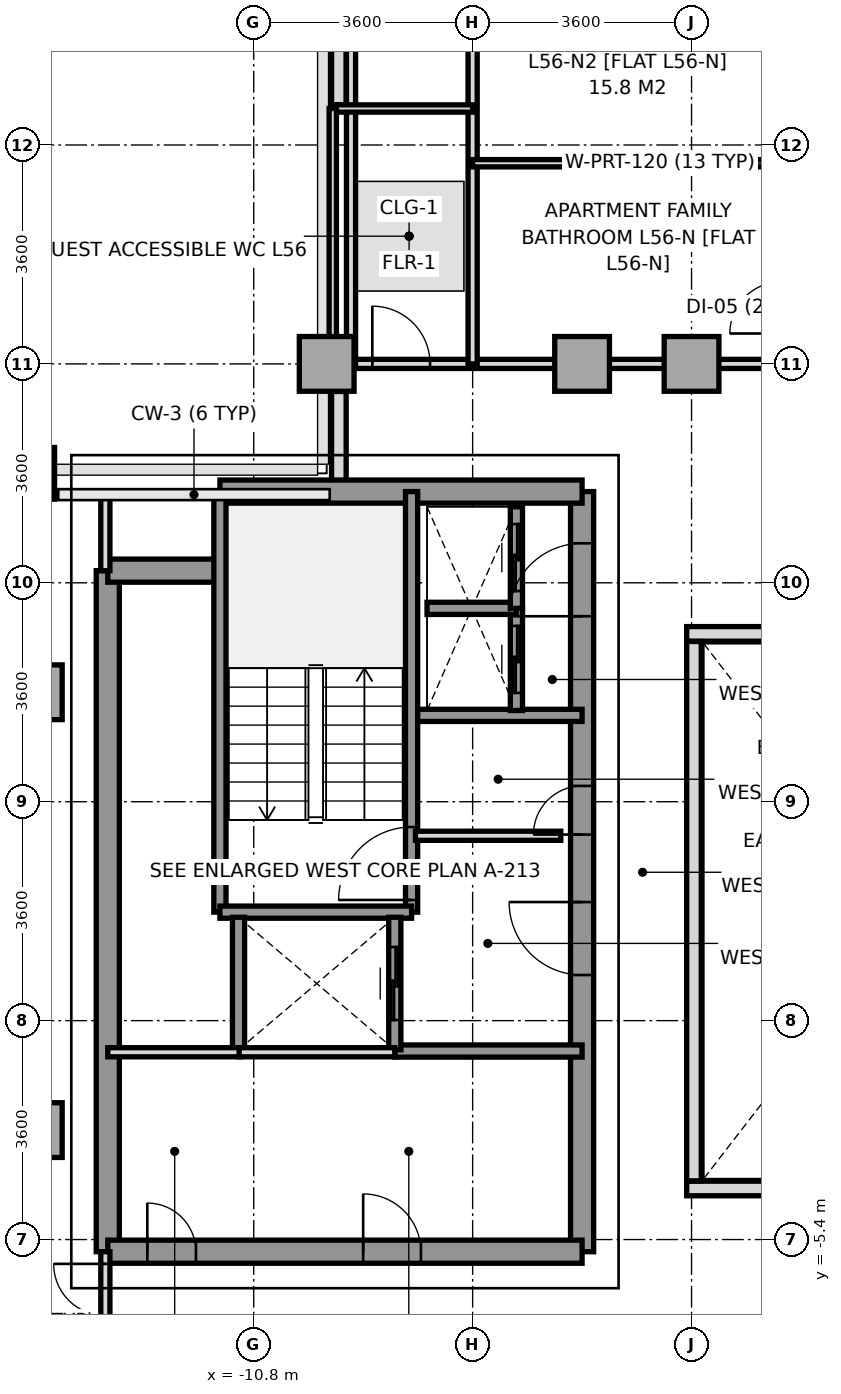
"""IFC4 building model, lengths in metres.
Left out: names, types, materials, properties, quantities, classifications, styles, units other than length and angle.
Written with IfcOpenShell. Run it as: python <this file> out.ifc"""

import sys

from ifc_helpers import new_model, si_unit, direction, frame, frame_2d, origin, origin_2d, place, context, subcontext, project, spatial, rectangle, extrude, source, transform, mapped, element, fill, save


model = new_model("IFC4")
c1 = context("Model", 3, precision=1e-05, world=origin(), true_north=direction((0.0, 1.0)))
c2 = subcontext(c1, "Body", "Model", "MODEL_VIEW")
j1 = project(units=[si_unit("LENGTHUNIT", "METRE"), si_unit("PLANEANGLEUNIT", "RADIAN")], contexts=[c1])
p1 = place(None, origin())
s1 = spatial("IfcSite", under=j1, at=p1, CompositionType="ELEMENT")
p2 = place(p1, origin())
s2 = spatial("IfcBuilding", under=s1, at=p2, CompositionType="ELEMENT")
p3 = place(p2, frame((0.0, 0.0, 204.6)))
s3 = spatial("IfcBuildingStorey", under=s2, at=p3, CompositionType="ELEMENT", Elevation=204.6)
m1 = source(origin(), c2, "Body", "SweptSolid", [
    extrude(rectangle(XDim=0.9, YDim=0.9, at=origin_2d()), origin(), (0.0, 0.0, 1.0), 3.2),
])
for number, where, z_axis, x_axis in (
    (1, (-14.4, -3.6, 0.0), (0.0, 0.0, 1.0), (1.0, 0.0, 0.0)),
    (2, (-14.4, 3.6, 0.0), (0.0, 0.0, 1.0), (1.0, 0.0, 0.0)),
):
    element("IfcColumn", number, at=place(p3, frame(where, z_axis=z_axis, x_axis=x_axis)), inside=s3, PredefinedType="COLUMN", context=c2, shape_type="MappedRepresentation", body=[
        mapped(m1, transform((0.0, 0.0, 0.0), x_axis=(1.0, 0.0, 0.0), y_axis=(0.0, 1.0, 0.0), z_axis=(0.0, 0.0, 1.0), scale=1.0)),
    ])
m2 = source(origin(), c2, "Body", "SweptSolid", [
    extrude(rectangle(XDim=0.65, YDim=0.85, at=origin_2d()), origin(), (0.0, 0.0, 1.0), 3.2),
])
p4 = place(p3, frame((-14.4, 7.2, 0.0), z_axis=(0.0, 0.0, 1.0), x_axis=(1.0, 0.0, 0.0)))
e3 = element("IfcColumn", 3, at=p4, inside=s3, PredefinedType="COLUMN", context=c2, shape_type="MappedRepresentation", body=[
    mapped(m2, transform((0.0, 0.0, 0.0), x_axis=(1.0, 0.0, 0.0), y_axis=(0.0, 1.0, 0.0), z_axis=(0.0, 0.0, 1.0), scale=1.0)),
])
for number, where, z_axis, x_axis in (
    (4, (-9.6, 9.0, 0.0), (0.0, 0.0, 1.0), (1.0, 0.0, 0.0)),
    (5, (-5.4, 9.0, 0.0), (0.0, 0.0, 1.0), (1.0, 0.0, 0.0)),
    (6, (-3.6, 9.0, 0.0), (0.0, 0.0, 1.0), (1.0, 0.0, 0.0)),
):
    element("IfcColumn", number, at=place(p3, frame(where, z_axis=z_axis, x_axis=x_axis)), inside=s3, PredefinedType="COLUMN", context=c2, shape_type="MappedRepresentation", body=[
        mapped(m1, transform((0.0, 0.0, 0.0), x_axis=(1.0, 0.0, 0.0), y_axis=(0.0, 1.0, 0.0), z_axis=(0.0, 0.0, 1.0), scale=1.0)),
    ])
p5 = place(p3, frame((-9.4, 6.953, 0.0), z_axis=(0.0, 0.0, 1.0), x_axis=(0.0, 1.0, 0.0)))
e7 = element("IfcWall", 7, at=p5, inside=s3, PredefinedType="PARAPET", context=c2, shape_type="SweptSolid", body=[
    extrude(rectangle(XDim=1.594, YDim=0.24, at=frame_2d((0.797, 0.0))), origin(), (0.0, 0.0, 1.0), 1.15),
])
p6 = place(p3, frame((-9.4, 13.263, 0.0), z_axis=(0.0, 0.0, 1.0), x_axis=(0.0, 1.0, 0.0)))
e8 = element("IfcWall", 8, at=p6, inside=s3, PredefinedType="PARAPET", context=c2, shape_type="SweptSolid", body=[
    extrude(rectangle(XDim=2.34, YDim=0.24, at=frame_2d((1.17, 0.0))), origin(), (0.0, 0.0, 1.0), 1.15),
])
p7 = place(p3, frame((-13.2, -5.6, 0.0), z_axis=(0.0, 0.0, 1.0), x_axis=(0.0, 1.0, 0.0)))
e9 = element("IfcWall", 9, at=p7, inside=s3, PredefinedType="SHEAR", context=c2, shape_type="SweptSolid", body=[
    extrude(rectangle(XDim=11.2, YDim=0.38, at=frame_2d((5.6, 0.0))), origin(), (0.0, 0.0, 1.0), 3.2),
])
p8 = place(p3, frame((-5.4, -5.6, 0.0), z_axis=(0.0, 0.0, 1.0), x_axis=(0.0, 1.0, 0.0)))
e10 = element("IfcWall", 10, at=p8, inside=s3, PredefinedType="SHEAR", context=c2, shape_type="SweptSolid", body=[
    extrude(rectangle(XDim=12.5, YDim=0.38, at=frame_2d((6.25, 0.0))), origin(), (0.0, 0.0, 1.0), 3.2),
])
p9 = place(p8, frame((4.55, 0.0, 0.0)))
e11 = element("IfcOpeningElement", 11, at=p9, cuts=e10, PredefinedType="OPENING", context=c2, shape_type="SweptSolid", body=[
    extrude(rectangle(XDim=1.2, YDim=2.2, at=frame_2d((0.6, 1.1))), frame((0.0, 0.2, 0.0), z_axis=(0.0, -1.0, 0.0), x_axis=(1.0, 0.0, 0.0)), (0.0, 0.0, 1.0), 0.4),
])
p10 = place(p8, frame((10.45, 0.0, 0.0)))
e12 = element("IfcOpeningElement", 12, at=p10, cuts=e10, PredefinedType="OPENING", context=c2, shape_type="SweptSolid", body=[
    extrude(rectangle(XDim=1.2, YDim=2.2, at=frame_2d((0.6, 1.1))), frame((0.0, 0.2, 0.0), z_axis=(0.0, -1.0, 0.0), x_axis=(1.0, 0.0, 0.0)), (0.0, 0.0, 1.0), 0.4),
])
p11 = place(p8, frame((6.86, 0.0, 0.0)))
e13 = element("IfcOpeningElement", 13, at=p11, cuts=e10, PredefinedType="OPENING", context=c2, shape_type="SweptSolid", body=[
    extrude(rectangle(XDim=0.8, YDim=2.1, at=frame_2d((0.4, 1.05))), frame((0.0, 0.2, 0.0), z_axis=(0.0, -1.0, 0.0), x_axis=(1.0, 0.0, 0.0)), (0.0, 0.0, 1.0), 0.4),
])
p12 = place(p3, frame((-11.356, 6.9, 0.0), z_axis=(0.0, 0.0, 1.0), x_axis=(1.0, 0.0, 0.0)))
e14 = element("IfcWall", 14, at=p12, inside=s3, PredefinedType="SHEAR", context=c2, shape_type="SweptSolid", body=[
    extrude(rectangle(XDim=5.956, YDim=0.38, at=frame_2d((2.978, 0.0))), origin(), (0.0, 0.0, 1.0), 3.2),
])
p13 = place(p3, frame((-13.2, 5.6, 0.0), z_axis=(0.0, 0.0, 1.0), x_axis=(1.0, 0.0, 0.0)))
e15 = element("IfcWall", 15, at=p13, inside=s3, PredefinedType="SHEAR", context=c2, shape_type="SweptSolid", body=[
    extrude(rectangle(XDim=1.844, YDim=0.38, at=frame_2d((0.922, 0.0))), origin(), (0.0, 0.0, 1.0), 3.2),
])
p14 = place(p3, frame((-13.2, -5.6, 0.0), z_axis=(0.0, 0.0, 1.0), x_axis=(1.0, 0.0, 0.0)))
e16 = element("IfcWall", 16, at=p14, inside=s3, PredefinedType="SHEAR", context=c2, shape_type="SweptSolid", body=[
    extrude(rectangle(XDim=7.8, YDim=0.38, at=frame_2d((3.9, 0.0))), origin(), (0.0, 0.0, 1.0), 3.2),
])
p15 = place(p14, frame((0.65, 0.0, 0.0)))
e17 = element("IfcOpeningElement", 17, at=p15, cuts=e16, PredefinedType="OPENING", context=c2, shape_type="SweptSolid", body=[
    extrude(rectangle(XDim=0.8, YDim=2.1, at=frame_2d((0.4, 1.05))), frame((0.0, 0.2, 0.0), z_axis=(0.0, -1.0, 0.0), x_axis=(1.0, 0.0, 0.0)), (0.0, 0.0, 1.0), 0.4),
])
p16 = place(p14, frame((4.2, 0.0, 0.0)))
e18 = element("IfcOpeningElement", 18, at=p16, cuts=e16, PredefinedType="OPENING", context=c2, shape_type="SweptSolid", body=[
    extrude(rectangle(XDim=0.95, YDim=2.15, at=frame_2d((0.475, 1.075))), frame((0.0, 0.2, 0.0), z_axis=(0.0, -1.0, 0.0), x_axis=(1.0, 0.0, 0.0)), (0.0, 0.0, 1.0), 0.4),
])
p17 = place(p3, frame((-8.18, 3.22, 0.0), z_axis=(0.0, 0.0, 1.0), x_axis=(1.0, 0.0, 0.0)))
e19 = element("IfcWall", 19, at=p17, inside=s3, PredefinedType="SOLIDWALL", context=c2, shape_type="SweptSolid", body=[
    extrude(rectangle(XDim=2.78, YDim=0.2, at=frame_2d((1.39, 0.0))), origin(), (0.0, 0.0, 1.0), 3.2),
])
p18 = place(p3, frame((-8.48, -2.3, 0.0), z_axis=(0.0, 0.0, 1.0), x_axis=(1.0, 0.0, 0.0)))
e20 = element("IfcWall", 20, at=p18, inside=s3, PredefinedType="SOLIDWALL", context=c2, shape_type="SweptSolid", body=[
    extrude(rectangle(XDim=3.08, YDim=0.2, at=frame_2d((1.54, 0.0))), origin(), (0.0, 0.0, 1.0), 3.2),
])
p19 = place(p3, frame((-8.204, -0.016, 0.0), z_axis=(0.0, 0.0, 1.0), x_axis=(0.0, 1.0, 0.0)))
e21 = element("IfcWall", 21, at=p19, inside=s3, PredefinedType="SOLIDWALL", context=c2, shape_type="SweptSolid", body=[
    extrude(rectangle(XDim=6.916, YDim=0.2, at=frame_2d((3.458, 0.0))), origin(), (0.0, 0.0, 1.0), 3.2),
])
p20 = place(p19, frame((0.2, 0.0, 0.0)))
e22 = element("IfcOpeningElement", 22, at=p20, cuts=e21, PredefinedType="OPENING", context=c2, shape_type="SweptSolid", body=[
    extrude(rectangle(XDim=1.2, YDim=2.2, at=frame_2d((0.6, 1.1))), frame((0.0, 0.11, 0.0), z_axis=(0.0, -1.0, 0.0), x_axis=(1.0, 0.0, 0.0)), (0.0, 0.0, 1.0), 0.22),
])
p21 = place(p3, frame((-11.356, -0.016, 0.0), z_axis=(0.0, 0.0, 1.0), x_axis=(0.0, 1.0, 0.0)))
e23 = element("IfcWall", 23, at=p21, inside=s3, PredefinedType="SOLIDWALL", context=c2, shape_type="SweptSolid", body=[
    extrude(rectangle(XDim=6.916, YDim=0.2, at=frame_2d((3.458, 0.0))), origin(), (0.0, 0.0, 1.0), 3.2),
])
p22 = place(p3, frame((-11.356, -0.016, 0.0), z_axis=(0.0, 0.0, 1.0), x_axis=(1.0, 0.0, 0.0)))
e24 = element("IfcWall", 24, at=p22, inside=s3, PredefinedType="SOLIDWALL", context=c2, shape_type="SweptSolid", body=[
    extrude(rectangle(XDim=3.152, YDim=0.2, at=frame_2d((1.576, 0.0))), origin(), (0.0, 0.0, 1.0), 3.2),
])
p23 = place(p3, frame((-11.05, -2.28, 0.0), z_axis=(0.0, 0.0, 1.0), x_axis=(0.0, 1.0, 0.0)))
e25 = element("IfcWall", 25, at=p23, inside=s3, PredefinedType="SOLIDWALL", context=c2, shape_type="SweptSolid", body=[
    extrude(rectangle(XDim=2.18, YDim=0.2, at=frame_2d((1.09, 0.0))), origin(), (0.0, 0.0, 1.0), 3.2),
])
p24 = place(p3, frame((-8.48, -2.28, 0.0), z_axis=(0.0, 0.0, 1.0), x_axis=(0.0, 1.0, 0.0)))
e26 = element("IfcWall", 26, at=p24, inside=s3, PredefinedType="SOLIDWALL", context=c2, shape_type="SweptSolid", body=[
    extrude(rectangle(XDim=2.18, YDim=0.2, at=frame_2d((1.09, 0.0))), origin(), (0.0, 0.0, 1.0), 3.2),
])
p25 = place(p24, frame((0.49, 0.0, 0.0)))
e27 = element("IfcOpeningElement", 27, at=p25, cuts=e26, PredefinedType="OPENING", context=c2, shape_type="SweptSolid", body=[
    extrude(rectangle(XDim=1.2, YDim=2.2, at=frame_2d((0.6, 1.1))), frame((0.0, 0.11, 0.0), z_axis=(0.0, -1.0, 0.0), x_axis=(1.0, 0.0, 0.0)), (0.0, 0.0, 1.0), 0.22),
])
p26 = place(p3, frame((-6.48, 3.3, 0.0), z_axis=(0.0, 0.0, 1.0), x_axis=(0.0, 1.0, 0.0)))
e28 = element("IfcWall", 28, at=p26, inside=s3, PredefinedType="SOLIDWALL", context=c2, shape_type="SweptSolid", body=[
    extrude(rectangle(XDim=1.68, YDim=0.2, at=frame_2d((0.84, 0.0))), origin(), (0.0, 0.0, 1.0), 3.2),
])
p27 = place(p26, frame((0.29, 0.0, 0.0)))
e29 = element("IfcOpeningElement", 29, at=p27, cuts=e28, PredefinedType="OPENING", context=c2, shape_type="SweptSolid", body=[
    extrude(rectangle(XDim=1.1, YDim=2.2, at=frame_2d((0.55, 1.1))), frame((0.0, 0.11, 0.0), z_axis=(0.0, -1.0, 0.0), x_axis=(1.0, 0.0, 0.0)), (0.0, 0.0, 1.0), 0.22),
])
p28 = place(p3, frame((-7.95, 4.98, 0.0), z_axis=(0.0, 0.0, 1.0), x_axis=(1.0, 0.0, 0.0)))
e30 = element("IfcWall", 30, at=p28, inside=s3, PredefinedType="SOLIDWALL", context=c2, shape_type="SweptSolid", body=[
    extrude(rectangle(XDim=1.47, YDim=0.2, at=frame_2d((0.735, 0.0))), origin(), (0.0, 0.0, 1.0), 3.2),
])
p29 = place(p3, frame((-6.48, 4.98, 0.0), z_axis=(0.0, 0.0, 1.0), x_axis=(0.0, 1.0, 0.0)))
e31 = element("IfcWall", 31, at=p29, inside=s3, PredefinedType="SOLIDWALL", context=c2, shape_type="SweptSolid", body=[
    extrude(rectangle(XDim=1.67, YDim=0.2, at=frame_2d((0.835, 0.0))), origin(), (0.0, 0.0, 1.0), 3.2),
])
p30 = place(p29, frame((0.285, 0.0, 0.0)))
e32 = element("IfcOpeningElement", 32, at=p30, cuts=e31, PredefinedType="OPENING", context=c2, shape_type="SweptSolid", body=[
    extrude(rectangle(XDim=1.1, YDim=2.2, at=frame_2d((0.55, 1.1))), frame((0.0, 0.11, 0.0), z_axis=(0.0, -1.0, 0.0), x_axis=(1.0, 0.0, 0.0)), (0.0, 0.0, 1.0), 0.22),
])
p31 = place(p3, frame((-8.14, 1.24, 0.0), z_axis=(0.0, 0.0, 1.0), x_axis=(1.0, 0.0, 0.0)))
e33 = element("IfcWall", 33, at=p31, inside=s3, PredefinedType="PARTITIONING", context=c2, shape_type="SweptSolid", body=[
    extrude(rectangle(XDim=2.39, YDim=0.15, at=frame_2d((1.195, 0.0))), origin(), (0.0, 0.0, 1.0), 2.3),
])
p32 = place(p3, frame((-13.2, -2.32, 0.0), z_axis=(0.0, 0.0, 1.0), x_axis=(1.0, 0.0, 0.0)))
e34 = element("IfcWall", 34, at=p32, inside=s3, PredefinedType="PARTITIONING", context=c2, shape_type="SweptSolid", body=[
    extrude(rectangle(XDim=2.18, YDim=0.15, at=frame_2d((1.09, 0.0))), origin(), (0.0, 0.0, 1.0), 3.2),
])
p33 = place(p3, frame((-11.04, -2.32, 0.0), z_axis=(0.0, 0.0, 1.0), x_axis=(1.0, 0.0, 0.0)))
e35 = element("IfcWall", 35, at=p33, inside=s3, PredefinedType="PARTITIONING", context=c2, shape_type="SweptSolid", body=[
    extrude(rectangle(XDim=2.56, YDim=0.15, at=frame_2d((1.28, 0.0))), origin(), (0.0, 0.0, 1.0), 3.2),
])
p34 = place(p3, frame((-9.55, 9.0, 0.0), z_axis=(0.0, 0.0, 1.0), x_axis=(1.0, 0.0, 0.0)))
e36 = element("IfcWall", 36, at=p34, inside=s3, PredefinedType="PARTITIONING", context=c2, shape_type="SweptSolid", body=[
    extrude(rectangle(XDim=19.1, YDim=0.15, at=frame_2d((9.55, 0.0))), origin(), (0.0, 0.0, 1.0), 2.75),
])
p35 = place(p34, frame((0.7, 0.0, 0.0)))
e37 = element("IfcOpeningElement", 37, at=p35, cuts=e36, PredefinedType="OPENING", context=c2, shape_type="SweptSolid", body=[
    extrude(rectangle(XDim=0.95, YDim=2.15, at=frame_2d((0.475, 1.075))), frame((0.0, 0.085, 0.0), z_axis=(0.0, -1.0, 0.0), x_axis=(1.0, 0.0, 0.0)), (0.0, 0.0, 1.0), 0.17),
])
p36 = place(p34, frame((9.05, 0.0, 0.0)))
e38 = element("IfcOpeningElement", 38, at=p36, cuts=e36, PredefinedType="OPENING", context=c2, shape_type="SweptSolid", body=[
    extrude(rectangle(XDim=1.0, YDim=2.2, at=frame_2d((0.5, 1.1))), frame((0.0, 0.085, 0.0), z_axis=(0.0, -1.0, 0.0), x_axis=(1.0, 0.0, 0.0)), (0.0, 0.0, 1.0), 0.17),
])
p37 = place(p3, frame((-9.2, 9.0, 0.0), z_axis=(0.0, 0.0, 1.0), x_axis=(0.0, 1.0, 0.0)))
e39 = element("IfcWall", 39, at=p37, inside=s3, PredefinedType="PARTITIONING", context=c2, shape_type="SweptSolid", body=[
    extrude(rectangle(XDim=6.68, YDim=0.15, at=frame_2d((3.34, 0.0))), origin(), (0.0, 0.0, 1.0), 2.75),
])
p38 = place(p3, frame((-7.2, 9.0, 0.0), z_axis=(0.0, 0.0, 1.0), x_axis=(0.0, 1.0, 0.0)))
e40 = element("IfcWall", 40, at=p38, inside=s3, PredefinedType="PARTITIONING", context=c2, shape_type="SweptSolid", body=[
    extrude(rectangle(XDim=12.02, YDim=0.15, at=frame_2d((6.01, 0.0))), origin(), (0.0, 0.0, 1.0), 2.75),
])
p39 = place(p3, frame((-7.2, 12.3, 0.0), z_axis=(0.0, 0.0, 1.0), x_axis=(1.0, 0.0, 0.0)))
e41 = element("IfcWall", 41, at=p39, inside=s3, PredefinedType="PARTITIONING", context=c2, shape_type="SweptSolid", body=[
    extrude(rectangle(XDim=5.08, YDim=0.12, at=frame_2d((2.54, 0.0))), origin(), (0.0, 0.0, 1.0), 3.2),
])
p40 = place(p3, frame((-9.5, 13.2, 0.0), z_axis=(0.0, 0.0, 1.0), x_axis=(1.0, 0.0, 0.0)))
e42 = element("IfcWall", 42, at=p40, inside=s3, PredefinedType="PARTITIONING", context=c2, shape_type="SweptSolid", body=[
    extrude(rectangle(XDim=2.3, YDim=0.12, at=frame_2d((1.15, 0.0))), origin(), (0.0, 0.0, 1.0), 3.2),
])
p41 = place(p3, frame((-9.5, 9.0, 0.0), z_axis=(0.0, 0.0, 1.0), x_axis=(0.0, 1.0, 0.0)))
e43 = element("IfcWall", 43, at=p41, inside=s3, PredefinedType="PARTITIONING", context=c2, shape_type="SweptSolid", body=[
    extrude(rectangle(XDim=4.2, YDim=0.12, at=frame_2d((2.1, 0.0))), origin(), (0.0, 0.0, 1.0), 3.2),
])
p42 = place(p3, frame((-13.24, 5.6, 0.0), z_axis=(0.0, 0.0, 1.0), x_axis=(0.0, 1.0, 0.0)))
e44 = element("IfcWall", 44, at=p42, inside=s3, PredefinedType="PARTITIONING", context=c2, shape_type="SweptSolid", body=[
    extrude(rectangle(XDim=1.25, YDim=0.15, at=frame_2d((0.625, 0.0))), origin(), (0.0, 0.0, 1.0), 3.2),
])
p43 = place(p3, frame((-13.24, -6.85, 0.0), z_axis=(0.0, 0.0, 1.0), x_axis=(0.0, 1.0, 0.0)))
e45 = element("IfcWall", 45, at=p43, inside=s3, PredefinedType="PARTITIONING", context=c2, shape_type="SweptSolid", body=[
    extrude(rectangle(XDim=1.25, YDim=0.15, at=frame_2d((0.625, 0.0))), origin(), (0.0, 0.0, 1.0), 3.2),
])
p44 = place(p43, frame((0.2, 0.0, 0.0)))
e46 = element("IfcOpeningElement", 46, at=p44, cuts=e45, PredefinedType="OPENING", context=c2, shape_type="SweptSolid", body=[
    extrude(rectangle(XDim=0.85, YDim=2.1, at=frame_2d((0.425, 1.05))), frame((0.0, 0.085, 0.0), z_axis=(0.0, -1.0, 0.0), x_axis=(1.0, 0.0, 0.0)), (0.0, 0.0, 1.0), 0.17),
])
for number, where, z_axis, x_axis in (
    (47, (-3.68, -4.56, 0.0), (0.0, 0.0, 1.0), (1.0, 0.0, 0.0)),
    (48, (-3.68, 4.56, 0.0), (0.0, 0.0, 1.0), (1.0, 0.0, 0.0)),
):
    element("IfcWall", number, at=place(p3, frame(where, z_axis=z_axis, x_axis=x_axis)), inside=s3, PredefinedType="PARAPET", context=c2, shape_type="SweptSolid", body=[
        extrude(rectangle(XDim=7.36, YDim=0.24, at=frame_2d((3.68, 0.0))), origin(), (0.0, 0.0, 1.0), 1.15),
    ])
p45 = place(p3, frame((-3.56, -4.435, 0.0), z_axis=(0.0, 0.0, 1.0), x_axis=(0.0, 1.0, 0.0)))
e49 = element("IfcWall", 49, at=p45, inside=s3, PredefinedType="PARAPET", context=c2, shape_type="SweptSolid", body=[
    extrude(rectangle(XDim=8.87, YDim=0.24, at=frame_2d((4.435, 0.0))), origin(), (0.0, 0.0, 1.0), 1.15),
])
m3 = source(origin(), c2, "Body", "SweptSolid", [
    extrude(rectangle(XDim=1.2, YDim=2.2, at=frame_2d((0.6, 1.1))), frame((0.0, 0.025, 0.0), z_axis=(0.0, -1.0, 0.0), x_axis=(1.0, 0.0, 0.0)), (0.0, 0.0, 1.0), 0.05),
])
p46 = place(p20, origin())
e50 = element("IfcDoor", 50, at=p46, inside=s3, OperationType="SINGLE_SWING_LEFT", PredefinedType="DOOR", context=c2, shape_type="MappedRepresentation", body=[
    mapped(m3, transform((0.0, 0.0, 0.0), x_axis=(1.0, 0.0, 0.0), y_axis=(0.0, 1.0, 0.0), z_axis=(0.0, 0.0, 1.0), scale=1.0)),
])
fill(e22, e50)
p47 = place(p9, origin())
e51 = element("IfcDoor", 51, at=p47, inside=s3, OperationType="SINGLE_SWING_RIGHT", PredefinedType="DOOR", context=c2, shape_type="MappedRepresentation", body=[
    mapped(m3, transform((0.0, 0.0, 0.0), x_axis=(1.0, 0.0, 0.0), y_axis=(0.0, 1.0, 0.0), z_axis=(0.0, 0.0, 1.0), scale=1.0)),
])
fill(e11, e51)
p48 = place(p10, origin())
e52 = element("IfcDoor", 52, at=p48, inside=s3, OperationType="SINGLE_SWING_LEFT", PredefinedType="DOOR", context=c2, shape_type="MappedRepresentation", body=[
    mapped(m3, transform((0.0, 0.0, 0.0), x_axis=(1.0, 0.0, 0.0), y_axis=(0.0, 1.0, 0.0), z_axis=(0.0, 0.0, 1.0), scale=1.0)),
])
fill(e12, e52)
m4 = source(origin(), c2, "Body", "SweptSolid", [
    extrude(rectangle(XDim=0.8, YDim=2.1, at=frame_2d((0.4, 1.05))), frame((0.0, 0.025, 0.0), z_axis=(0.0, -1.0, 0.0), x_axis=(1.0, 0.0, 0.0)), (0.0, 0.0, 1.0), 0.05),
])
p49 = place(p11, origin())
e53 = element("IfcDoor", 53, at=p49, inside=s3, OperationType="SINGLE_SWING_LEFT", PredefinedType="DOOR", context=c2, shape_type="MappedRepresentation", body=[
    mapped(m4, transform((0.0, 0.0, 0.0), x_axis=(1.0, 0.0, 0.0), y_axis=(0.0, 1.0, 0.0), z_axis=(0.0, 0.0, 1.0), scale=1.0)),
])
fill(e13, e53)
p50 = place(p15, origin())
e54 = element("IfcDoor", 54, at=p50, inside=s3, OperationType="SINGLE_SWING_LEFT", PredefinedType="DOOR", context=c2, shape_type="MappedRepresentation", body=[
    mapped(m4, transform((0.0, 0.0, 0.0), x_axis=(1.0, 0.0, 0.0), y_axis=(0.0, 1.0, 0.0), z_axis=(0.0, 0.0, 1.0), scale=1.0)),
])
fill(e17, e54)
m5 = source(origin(), c2, "Body", "SweptSolid", [
    extrude(rectangle(XDim=0.95, YDim=2.15, at=frame_2d((0.475, 1.075))), frame((0.0, 0.025, 0.0), z_axis=(0.0, -1.0, 0.0), x_axis=(1.0, 0.0, 0.0)), (0.0, 0.0, 1.0), 0.05),
])
p51 = place(p16, origin())
e55 = element("IfcDoor", 55, at=p51, inside=s3, OperationType="SINGLE_SWING_LEFT", PredefinedType="DOOR", context=c2, shape_type="MappedRepresentation", body=[
    mapped(m5, transform((0.0, 0.0, 0.0), x_axis=(1.0, 0.0, 0.0), y_axis=(0.0, 1.0, 0.0), z_axis=(0.0, 0.0, 1.0), scale=1.0)),
])
fill(e18, e55)
p52 = place(p25, origin())
e56 = element("IfcDoor", 56, at=p52, inside=s3, OperationType="SLIDING_TO_RIGHT", PredefinedType="DOOR", context=c2, shape_type="MappedRepresentation", body=[
    mapped(m3, transform((0.0, 0.0, 0.0), x_axis=(1.0, 0.0, 0.0), y_axis=(0.0, 1.0, 0.0), z_axis=(0.0, 0.0, 1.0), scale=1.0)),
])
fill(e27, e56)
m6 = source(origin(), c2, "Body", "SweptSolid", [
    extrude(rectangle(XDim=1.1, YDim=2.2, at=frame_2d((0.55, 1.1))), frame((0.0, 0.025, 0.0), z_axis=(0.0, -1.0, 0.0), x_axis=(1.0, 0.0, 0.0)), (0.0, 0.0, 1.0), 0.05),
])
p53 = place(p27, origin())
e57 = element("IfcDoor", 57, at=p53, inside=s3, OperationType="SLIDING_TO_LEFT", PredefinedType="DOOR", context=c2, shape_type="MappedRepresentation", body=[
    mapped(m6, transform((0.0, 0.0, 0.0), x_axis=(1.0, 0.0, 0.0), y_axis=(0.0, 1.0, 0.0), z_axis=(0.0, 0.0, 1.0), scale=1.0)),
])
fill(e29, e57)
p54 = place(p30, origin())
e58 = element("IfcDoor", 58, at=p54, inside=s3, OperationType="SLIDING_TO_LEFT", PredefinedType="DOOR", context=c2, shape_type="MappedRepresentation", body=[
    mapped(m6, transform((0.0, 0.0, 0.0), x_axis=(1.0, 0.0, 0.0), y_axis=(0.0, 1.0, 0.0), z_axis=(0.0, 0.0, 1.0), scale=1.0)),
])
fill(e32, e58)
p55 = place(p35, origin())
e59 = element("IfcDoor", 59, at=p55, inside=s3, OperationType="SINGLE_SWING_LEFT", PredefinedType="DOOR", context=c2, shape_type="MappedRepresentation", body=[
    mapped(m5, transform((0.0, 0.0, 0.0), x_axis=(1.0, 0.0, 0.0), y_axis=(0.0, 1.0, 0.0), z_axis=(0.0, 0.0, 1.0), scale=1.0)),
])
fill(e37, e59)
m7 = source(origin(), c2, "Body", "SweptSolid", [
    extrude(rectangle(XDim=0.85, YDim=2.1, at=frame_2d((0.425, 1.05))), frame((0.0, 0.025, 0.0), z_axis=(0.0, -1.0, 0.0), x_axis=(1.0, 0.0, 0.0)), (0.0, 0.0, 1.0), 0.05),
])
p56 = place(p44, origin())
e60 = element("IfcDoor", 60, at=p56, inside=s3, OperationType="SINGLE_SWING_RIGHT", PredefinedType="DOOR", context=c2, shape_type="MappedRepresentation", body=[
    mapped(m7, transform((0.0, 0.0, 0.0), x_axis=(1.0, 0.0, 0.0), y_axis=(0.0, 1.0, 0.0), z_axis=(0.0, 0.0, 1.0), scale=1.0)),
])
fill(e46, e60)
save(model, sys.argv[1])
